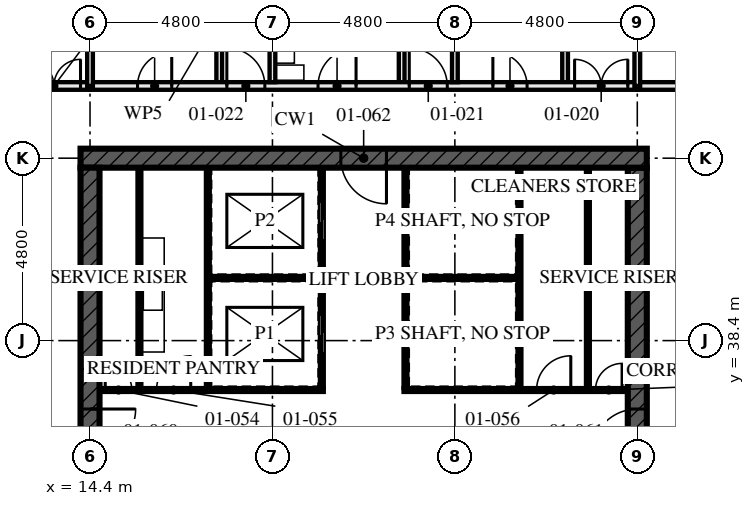
"""IFC4 building model, lengths in metres.
Left out: names, types, materials, properties, quantities, classifications, styles, units other than length and angle.
Written with IfcOpenShell. Run it as: python <this file> out.ifc"""

import sys

from ifc_helpers import new_model, si_unit, direction, frame, frame_2d, origin, place, context, subcontext, project, spatial, rectangle, extrude, element, fill, save


model = new_model("IFC4")
c1 = context("Model", 3, precision=1e-05, world=origin(), true_north=direction((0.0, 1.0)))
c2 = subcontext(c1, "Body", "Model", "MODEL_VIEW")
j1 = project(units=[si_unit("LENGTHUNIT", "METRE"), si_unit("PLANEANGLEUNIT", "RADIAN")], contexts=[c1])
p1 = place(None, origin())
s1 = spatial("IfcSite", under=j1, at=p1, CompositionType="ELEMENT")
p2 = place(p1, origin())
s2 = spatial("IfcBuilding", under=s1, at=p2, CompositionType="ELEMENT")
p3 = place(p2, frame((0.0, 0.0, 4.5)))
s3 = spatial("IfcBuildingStorey", under=s2, at=p3, CompositionType="ELEMENT", Elevation=4.5)
p4 = place(p3, frame((29.05, 43.2, -0.17), z_axis=(0.0, 0.0, 1.0), x_axis=(-1.0, 0.0, 0.0)))
e1 = element("IfcWall", 1, at=p4, inside=s3, PredefinedType="SHEAR", context=c2, shape_type="SweptSolid", body=[
    extrude(rectangle(XDim=14.9, YDim=0.5, at=frame_2d((7.45, 0.0))), origin(), (0.0, 0.0, 1.0), 4.5),
])
p5 = place(p4, frame((6.85, 0.0, 0.17)))
e2 = element("IfcOpeningElement", 2, at=p5, cuts=e1, PredefinedType="OPENING", context=c2, shape_type="SweptSolid", body=[
    extrude(rectangle(XDim=1.2, YDim=2.1, at=frame_2d((0.6, 1.05))), frame((0.0, 0.26, 0.0), z_axis=(0.0, -1.0, 0.0), x_axis=(1.0, 0.0, 0.0)), (0.0, 0.0, 1.0), 0.521),
])
p6 = place(p3, frame((14.4, 42.95, -0.17), z_axis=(0.0, 0.0, 1.0), x_axis=(0.0, -1.0, 0.0)))
e3 = element("IfcWall", 3, at=p6, inside=s3, PredefinedType="SHEAR", context=c2, shape_type="SweptSolid", body=[
    extrude(rectangle(XDim=13.9, YDim=0.5, at=frame_2d((6.95, 0.0))), origin(), (0.0, 0.0, 1.0), 4.5),
])
p7 = place(p6, frame((6.35, 0.0, 0.17)))
e4 = element("IfcOpeningElement", 4, at=p7, cuts=e3, PredefinedType="OPENING", context=c2, shape_type="SweptSolid", body=[
    extrude(rectangle(XDim=1.2, YDim=2.1, at=frame_2d((0.6, 1.05))), frame((0.0, 0.26, 0.0), z_axis=(0.0, -1.0, 0.0), x_axis=(1.0, 0.0, 0.0)), (0.0, 0.0, 1.0), 0.521),
])
p8 = place(p3, frame((28.8, 29.05, -0.17), z_axis=(0.0, 0.0, 1.0), x_axis=(0.0, 1.0, 0.0)))
e5 = element("IfcWall", 5, at=p8, inside=s3, PredefinedType="SHEAR", context=c2, shape_type="SweptSolid", body=[
    extrude(rectangle(XDim=13.9, YDim=0.5, at=frame_2d((6.95, 0.0))), origin(), (0.0, 0.0, 1.0), 4.5),
])
p9 = place(p8, frame((6.35, 0.0, 0.17)))
e6 = element("IfcOpeningElement", 6, at=p9, cuts=e5, PredefinedType="OPENING", context=c2, shape_type="SweptSolid", body=[
    extrude(rectangle(XDim=1.2, YDim=2.1, at=frame_2d((0.6, 1.05))), frame((0.0, 0.26, 0.0), z_axis=(0.0, -1.0, 0.0), x_axis=(1.0, 0.0, 0.0)), (0.0, 0.0, 1.0), 0.521),
])
p10 = place(p3, frame((14.4, 45.1, 0.0), z_axis=(0.0, 0.0, 1.0), x_axis=(-1.0, 0.0, 0.0)))
e7 = element("IfcWall", 7, at=p10, inside=s3, PredefinedType="PARTITIONING", context=c2, shape_type="SweptSolid", body=[
    extrude(rectangle(XDim=14.855, YDim=0.2, at=frame_2d((7.427, 0.0))), origin(), (0.0, 0.0, 1.0), 3.32),
])
p11 = place(p10, frame((0.25, 0.0, 0.0)))
e8 = element("IfcOpeningElement", 8, at=p11, cuts=e7, PredefinedType="OPENING", context=c2, shape_type="SweptSolid", body=[
    extrude(rectangle(XDim=1.4, YDim=2.4, at=frame_2d((0.7, 1.2))), frame((0.0, 0.111, 0.0), z_axis=(0.0, -1.0, 0.0), x_axis=(1.0, 0.0, 0.0)), (0.0, 0.0, 1.0), 0.221),
])
p12 = place(p10, frame((5.05, 0.0, 0.0)))
e9 = element("IfcOpeningElement", 9, at=p12, cuts=e7, PredefinedType="OPENING", context=c2, shape_type="SweptSolid", body=[
    extrude(rectangle(XDim=1.4, YDim=2.4, at=frame_2d((0.7, 1.2))), frame((0.0, 0.111, 0.0), z_axis=(0.0, -1.0, 0.0), x_axis=(1.0, 0.0, 0.0)), (0.0, 0.0, 1.0), 0.221),
])
p13 = place(p10, frame((9.8, 0.0, 0.0)))
e10 = element("IfcOpeningElement", 10, at=p13, cuts=e7, PredefinedType="OPENING", context=c2, shape_type="SweptSolid", body=[
    extrude(rectangle(XDim=1.0, YDim=2.4, at=frame_2d((0.5, 1.2))), frame((0.0, 0.111, 0.0), z_axis=(0.0, -1.0, 0.0), x_axis=(1.0, 0.0, 0.0)), (0.0, 0.0, 1.0), 0.221),
])
p14 = place(p10, frame((2.9, 0.0, 0.0)))
e11 = element("IfcOpeningElement", 11, at=p14, cuts=e7, PredefinedType="OPENING", context=c2, shape_type="SweptSolid", body=[
    extrude(rectangle(XDim=0.9, YDim=2.1, at=frame_2d((0.45, 1.05))), frame((0.0, 0.111, 0.0), z_axis=(0.0, -1.0, 0.0), x_axis=(1.0, 0.0, 0.0)), (0.0, 0.0, 1.0), 0.221),
])
p15 = place(p10, frame((7.65, 0.0, 0.0)))
e12 = element("IfcOpeningElement", 12, at=p15, cuts=e7, PredefinedType="OPENING", context=c2, shape_type="SweptSolid", body=[
    extrude(rectangle(XDim=1.0, YDim=2.1, at=frame_2d((0.5, 1.05))), frame((0.0, 0.111, 0.0), z_axis=(0.0, -1.0, 0.0), x_axis=(1.0, 0.0, 0.0)), (0.0, 0.0, 1.0), 0.221),
])
p16 = place(p10, frame((12.25, 0.0, 0.0)))
e13 = element("IfcOpeningElement", 13, at=p16, cuts=e7, PredefinedType="OPENING", context=c2, shape_type="SweptSolid", body=[
    extrude(rectangle(XDim=0.9, YDim=2.1, at=frame_2d((0.45, 1.05))), frame((0.0, 0.111, 0.0), z_axis=(0.0, -1.0, 0.0), x_axis=(1.0, 0.0, 0.0)), (0.0, 0.0, 1.0), 0.221),
])
for number, where, z_axis, x_axis in (
    (14, (26.9, 48.7, 0.0), (0.0, 0.0, 1.0), (0.0, -1.0, 0.0)),
    (15, (22.6, 48.7, 0.0), (0.0, 0.0, 1.0), (0.0, -1.0, 0.0)),
    (16, (17.8, 48.7, 0.0), (0.0, 0.0, 1.0), (0.0, -1.0, 0.0)),
):
    element("IfcWall", number, at=place(p3, frame(where, z_axis=z_axis, x_axis=x_axis)), inside=s3, PredefinedType="PARTITIONING", context=c2, shape_type="SweptSolid", body=[
        extrude(rectangle(XDim=3.5, YDim=0.15, at=frame_2d((1.75, 0.0))), origin(), (0.0, 0.0, 1.0), 3.55),
    ])
for number, where, z_axis, x_axis in (
    (17, (24.0, 57.255, 0.0), (0.0, 0.0, 1.0), (0.0, -1.0, 0.0)),
    (18, (19.2, 57.255, 0.0), (0.0, 0.0, 1.0), (0.0, -1.0, 0.0)),
):
    element("IfcWall", number, at=place(p3, frame(where, z_axis=z_axis, x_axis=x_axis)), inside=s3, PredefinedType="PARTITIONING", context=c2, shape_type="SweptSolid", body=[
        extrude(rectangle(XDim=12.055, YDim=0.15, at=frame_2d((6.027, 0.0))), origin(), (0.0, 0.0, 1.0), 3.55),
    ])
p17 = place(p3, frame((28.8, 45.1, 0.0), z_axis=(0.0, 0.0, 1.0), x_axis=(-1.0, 0.0, 0.0)))
e19 = element("IfcWall", 19, at=p17, inside=s3, PredefinedType="PARTITIONING", context=c2, shape_type="SweptSolid", body=[
    extrude(rectangle(XDim=14.4, YDim=0.2, at=frame_2d((7.2, 0.0))), origin(), (0.0, 0.0, 1.0), 4.33),
])
p18 = place(p17, frame((0.25, 0.0, 0.0)))
e20 = element("IfcOpeningElement", 20, at=p18, cuts=e19, PredefinedType="OPENING", context=c2, shape_type="SweptSolid", body=[
    extrude(rectangle(XDim=1.4, YDim=2.4, at=frame_2d((0.7, 1.2))), frame((0.0, 0.111, 0.0), z_axis=(0.0, -1.0, 0.0), x_axis=(1.0, 0.0, 0.0)), (0.0, 0.0, 1.0), 0.221),
])
p19 = place(p17, frame((5.0, 0.0, 0.0)))
e21 = element("IfcOpeningElement", 21, at=p19, cuts=e19, PredefinedType="OPENING", context=c2, shape_type="SweptSolid", body=[
    extrude(rectangle(XDim=1.0, YDim=2.4, at=frame_2d((0.5, 1.2))), frame((0.0, 0.111, 0.0), z_axis=(0.0, -1.0, 0.0), x_axis=(1.0, 0.0, 0.0)), (0.0, 0.0, 1.0), 0.221),
])
p20 = place(p17, frame((9.8, 0.0, 0.0)))
e22 = element("IfcOpeningElement", 22, at=p20, cuts=e19, PredefinedType="OPENING", context=c2, shape_type="SweptSolid", body=[
    extrude(rectangle(XDim=1.0, YDim=2.4, at=frame_2d((0.5, 1.2))), frame((0.0, 0.111, 0.0), z_axis=(0.0, -1.0, 0.0), x_axis=(1.0, 0.0, 0.0)), (0.0, 0.0, 1.0), 0.221),
])
p21 = place(p17, frame((2.9, 0.0, 0.0)))
e23 = element("IfcOpeningElement", 23, at=p21, cuts=e19, PredefinedType="OPENING", context=c2, shape_type="SweptSolid", body=[
    extrude(rectangle(XDim=0.9, YDim=2.1, at=frame_2d((0.45, 1.05))), frame((0.0, 0.111, 0.0), z_axis=(0.0, -1.0, 0.0), x_axis=(1.0, 0.0, 0.0)), (0.0, 0.0, 1.0), 0.221),
])
p22 = place(p17, frame((7.4, 0.0, 0.0)))
e24 = element("IfcOpeningElement", 24, at=p22, cuts=e19, PredefinedType="OPENING", context=c2, shape_type="SweptSolid", body=[
    extrude(rectangle(XDim=1.0, YDim=2.1, at=frame_2d((0.5, 1.05))), frame((0.0, 0.111, 0.0), z_axis=(0.0, -1.0, 0.0), x_axis=(1.0, 0.0, 0.0)), (0.0, 0.0, 1.0), 0.221),
])
p23 = place(p17, frame((12.25, 0.0, 0.0)))
e25 = element("IfcOpeningElement", 25, at=p23, cuts=e19, PredefinedType="OPENING", context=c2, shape_type="SweptSolid", body=[
    extrude(rectangle(XDim=0.9, YDim=2.1, at=frame_2d((0.45, 1.05))), frame((0.0, 0.111, 0.0), z_axis=(0.0, -1.0, 0.0), x_axis=(1.0, 0.0, 0.0)), (0.0, 0.0, 1.0), 0.221),
])
p24 = place(p3, frame((43.655, 45.1, 0.0), z_axis=(0.0, 0.0, 1.0), x_axis=(-1.0, 0.0, 0.0)))
e26 = element("IfcWall", 26, at=p24, inside=s3, PredefinedType="PARTITIONING", context=c2, shape_type="SweptSolid", body=[
    extrude(rectangle(XDim=14.855, YDim=0.2, at=frame_2d((7.427, 0.0))), origin(), (0.0, 0.0, 1.0), 3.32),
])
p25 = place(p24, frame((0.705, 0.0, 0.0)))
e27 = element("IfcOpeningElement", 27, at=p25, cuts=e26, PredefinedType="OPENING", context=c2, shape_type="SweptSolid", body=[
    extrude(rectangle(XDim=1.4, YDim=2.4, at=frame_2d((0.7, 1.2))), frame((0.0, 0.111, 0.0), z_axis=(0.0, -1.0, 0.0), x_axis=(1.0, 0.0, 0.0)), (0.0, 0.0, 1.0), 0.221),
])
p26 = place(p24, frame((5.505, 0.0, 0.0)))
e28 = element("IfcOpeningElement", 28, at=p26, cuts=e26, PredefinedType="OPENING", context=c2, shape_type="SweptSolid", body=[
    extrude(rectangle(XDim=1.4, YDim=2.4, at=frame_2d((0.7, 1.2))), frame((0.0, 0.111, 0.0), z_axis=(0.0, -1.0, 0.0), x_axis=(1.0, 0.0, 0.0)), (0.0, 0.0, 1.0), 0.221),
])
p27 = place(p24, frame((10.255, 0.0, 0.0)))
e29 = element("IfcOpeningElement", 29, at=p27, cuts=e26, PredefinedType="OPENING", context=c2, shape_type="SweptSolid", body=[
    extrude(rectangle(XDim=1.0, YDim=2.4, at=frame_2d((0.5, 1.2))), frame((0.0, 0.111, 0.0), z_axis=(0.0, -1.0, 0.0), x_axis=(1.0, 0.0, 0.0)), (0.0, 0.0, 1.0), 0.221),
])
p28 = place(p24, frame((3.355, 0.0, 0.0)))
e30 = element("IfcOpeningElement", 30, at=p28, cuts=e26, PredefinedType="OPENING", context=c2, shape_type="SweptSolid", body=[
    extrude(rectangle(XDim=0.9, YDim=2.1, at=frame_2d((0.45, 1.05))), frame((0.0, 0.111, 0.0), z_axis=(0.0, -1.0, 0.0), x_axis=(1.0, 0.0, 0.0)), (0.0, 0.0, 1.0), 0.221),
])
p29 = place(p24, frame((8.105, 0.0, 0.0)))
e31 = element("IfcOpeningElement", 31, at=p29, cuts=e26, PredefinedType="OPENING", context=c2, shape_type="SweptSolid", body=[
    extrude(rectangle(XDim=1.0, YDim=2.1, at=frame_2d((0.5, 1.05))), frame((0.0, 0.111, 0.0), z_axis=(0.0, -1.0, 0.0), x_axis=(1.0, 0.0, 0.0)), (0.0, 0.0, 1.0), 0.221),
])
p30 = place(p24, frame((12.705, 0.0, 0.0)))
e32 = element("IfcOpeningElement", 32, at=p30, cuts=e26, PredefinedType="OPENING", context=c2, shape_type="SweptSolid", body=[
    extrude(rectangle(XDim=0.9, YDim=2.1, at=frame_2d((0.45, 1.05))), frame((0.0, 0.111, 0.0), z_axis=(0.0, -1.0, 0.0), x_axis=(1.0, 0.0, 0.0)), (0.0, 0.0, 1.0), 0.221),
])
for number, where, z_axis, x_axis in (
    (33, (15.7, 37.15, 0.0), (0.0, 0.0, 1.0), (0.0, 1.0, 0.0)),
    (34, (27.5, 37.15, 0.0), (0.0, 0.0, 1.0), (0.0, 1.0, 0.0)),
):
    element("IfcWall", number, at=place(p3, frame(where, z_axis=z_axis, x_axis=x_axis)), inside=s3, PredefinedType="SOLIDWALL", context=c2, shape_type="SweptSolid", body=[
        extrude(rectangle(XDim=5.8, YDim=0.1, at=frame_2d((2.9, 0.0))), origin(), (0.0, 0.0, 1.0), 4.33),
    ])
p31 = place(p3, frame((20.5, 37.15, 0.0), z_axis=(0.0, 0.0, 1.0), x_axis=(0.0, 1.0, 0.0)))
e35 = element("IfcWall", 35, at=p31, inside=s3, PredefinedType="SOLIDWALL", context=c2, shape_type="SweptSolid", body=[
    extrude(rectangle(XDim=5.8, YDim=0.1, at=frame_2d((2.9, 0.0))), origin(), (0.0, 0.0, 1.0), 4.33),
])
p32 = place(p31, frame((0.925, 0.0, 0.0)))
e36 = element("IfcOpeningElement", 36, at=p32, cuts=e35, PredefinedType="OPENING", context=c2, shape_type="SweptSolid", body=[
    extrude(rectangle(XDim=1.0, YDim=2.1, at=frame_2d((0.5, 1.05))), frame((0.0, 0.061, 0.0), z_axis=(0.0, -1.0, 0.0), x_axis=(1.0, 0.0, 0.0)), (0.0, 0.0, 1.0), 0.121),
])
p33 = place(p31, frame((3.9, 0.0, 0.0)))
e37 = element("IfcOpeningElement", 37, at=p33, cuts=e35, PredefinedType="OPENING", context=c2, shape_type="SweptSolid", body=[
    extrude(rectangle(XDim=1.0, YDim=2.1, at=frame_2d((0.5, 1.05))), frame((0.0, 0.061, 0.0), z_axis=(0.0, -1.0, 0.0), x_axis=(1.0, 0.0, 0.0)), (0.0, 0.0, 1.0), 0.121),
])
p34 = place(p3, frame((22.7, 37.15, 0.0), z_axis=(0.0, 0.0, 1.0), x_axis=(0.0, 1.0, 0.0)))
e38 = element("IfcWall", 38, at=p34, inside=s3, PredefinedType="SOLIDWALL", context=c2, shape_type="SweptSolid", body=[
    extrude(rectangle(XDim=5.8, YDim=0.1, at=frame_2d((2.9, 0.0))), origin(), (0.0, 0.0, 1.0), 4.33),
])
p35 = place(p3, frame((14.65, 37.1, 0.0), z_axis=(0.0, 0.0, 1.0), x_axis=(1.0, 0.0, 0.0)))
e39 = element("IfcWall", 39, at=p35, inside=s3, PredefinedType="SOLIDWALL", context=c2, shape_type="SweptSolid", body=[
    extrude(rectangle(XDim=5.9, YDim=0.1, at=frame_2d((2.95, 0.0))), origin(), (0.0, 0.0, 1.0), 4.33),
])
p36 = place(p35, frame((0.15, 0.0, 0.0)))
e40 = element("IfcOpeningElement", 40, at=p36, cuts=e39, PredefinedType="OPENING", context=c2, shape_type="SweptSolid", body=[
    extrude(rectangle(XDim=0.7, YDim=2.1, at=frame_2d((0.35, 1.05))), frame((0.0, 0.061, 0.0), z_axis=(0.0, -1.0, 0.0), x_axis=(1.0, 0.0, 0.0)), (0.0, 0.0, 1.0), 0.121),
])
p37 = place(p35, frame((1.5, 0.0, 0.0)))
e41 = element("IfcOpeningElement", 41, at=p37, cuts=e39, PredefinedType="OPENING", context=c2, shape_type="SweptSolid", body=[
    extrude(rectangle(XDim=0.9, YDim=2.1, at=frame_2d((0.45, 1.05))), frame((0.0, 0.061, 0.0), z_axis=(0.0, -1.0, 0.0), x_axis=(1.0, 0.0, 0.0)), (0.0, 0.0, 1.0), 0.121),
])
p38 = place(p3, frame((22.65, 37.1, 0.0), z_axis=(0.0, 0.0, 1.0), x_axis=(1.0, 0.0, 0.0)))
e42 = element("IfcWall", 42, at=p38, inside=s3, PredefinedType="SOLIDWALL", context=c2, shape_type="SweptSolid", body=[
    extrude(rectangle(XDim=5.9, YDim=0.1, at=frame_2d((2.95, 0.0))), origin(), (0.0, 0.0, 1.0), 4.33),
])
p39 = place(p38, frame((3.5, 0.0, 0.0)))
e43 = element("IfcOpeningElement", 43, at=p39, cuts=e42, PredefinedType="OPENING", context=c2, shape_type="SweptSolid", body=[
    extrude(rectangle(XDim=0.9, YDim=2.1, at=frame_2d((0.45, 1.05))), frame((0.0, 0.061, 0.0), z_axis=(0.0, -1.0, 0.0), x_axis=(1.0, 0.0, 0.0)), (0.0, 0.0, 1.0), 0.121),
])
p40 = place(p38, frame((5.05, 0.0, 0.0)))
e44 = element("IfcOpeningElement", 44, at=p40, cuts=e42, PredefinedType="OPENING", context=c2, shape_type="SweptSolid", body=[
    extrude(rectangle(XDim=0.7, YDim=2.1, at=frame_2d((0.35, 1.05))), frame((0.0, 0.061, 0.0), z_axis=(0.0, -1.0, 0.0), x_axis=(1.0, 0.0, 0.0)), (0.0, 0.0, 1.0), 0.121),
])
p41 = place(p3, frame((17.5, 37.15, 0.0), z_axis=(0.0, 0.0, 1.0), x_axis=(0.0, 1.0, 0.0)))
e45 = element("IfcWall", 45, at=p41, inside=s3, PredefinedType="SOLIDWALL", context=c2, shape_type="SweptSolid", body=[
    extrude(rectangle(XDim=5.8, YDim=0.1, at=frame_2d((2.9, 0.0))), origin(), (0.0, 0.0, 1.0), 4.33),
])
for number, where, z_axis, x_axis in (
    (46, (17.55, 40.05, 0.0), (0.0, 0.0, 1.0), (1.0, 0.0, 0.0)),
    (47, (22.75, 40.05, 0.0), (0.0, 0.0, 1.0), (1.0, 0.0, 0.0)),
):
    element("IfcWall", number, at=place(p3, frame(where, z_axis=z_axis, x_axis=x_axis)), inside=s3, PredefinedType="SOLIDWALL", context=c2, shape_type="SweptSolid", body=[
        extrude(rectangle(XDim=2.9, YDim=0.1, at=frame_2d((1.45, 0.0))), origin(), (0.0, 0.0, 1.0), 4.33),
    ])
p42 = place(p3, frame((25.7, 37.15, 0.0), z_axis=(0.0, 0.0, 1.0), x_axis=(0.0, 1.0, 0.0)))
e48 = element("IfcWall", 48, at=p42, inside=s3, PredefinedType="SOLIDWALL", context=c2, shape_type="SweptSolid", body=[
    extrude(rectangle(XDim=5.8, YDim=0.1, at=frame_2d((2.9, 0.0))), origin(), (0.0, 0.0, 1.0), 4.33),
])
for number, where, z_axis, x_axis in (
    (49, (14.4, 45.1, 0.0), (0.0, 0.0, 1.0), (0.0, 1.0, 0.0)),
    (50, (28.8, 45.1, 0.0), (0.0, 0.0, 1.0), (0.0, 1.0, 0.0)),
):
    element("IfcWall", number, at=place(p3, frame(where, z_axis=z_axis, x_axis=x_axis)), inside=s3, PredefinedType="PARTITIONING", context=c2, shape_type="SweptSolid", body=[
        extrude(rectangle(XDim=2.53, YDim=0.15, at=frame_2d((1.265, 0.0))), origin(), (0.0, 0.0, 1.0), 3.32),
    ])
p43 = place(p11, frame((1.4, 0.0, 0.0), z_axis=(0.0, 0.0, 1.0), x_axis=(-1.0, 0.0, 0.0)))
e51 = element("IfcDoor", 51, at=p43, inside=s3, OperationType="DOUBLE_DOOR_SINGLE_SWING", PredefinedType="DOOR", context=c2, shape_type="SweptSolid", body=[
    extrude(rectangle(XDim=1.4, YDim=2.4, at=frame_2d((0.7, 1.2))), frame((0.0, 0.027, 0.0), z_axis=(0.0, -1.0, 0.0), x_axis=(1.0, 0.0, 0.0)), (0.0, 0.0, 1.0), 0.054),
])
fill(e8, e51)
p44 = place(p18, frame((1.4, 0.0, 0.0), z_axis=(0.0, 0.0, 1.0), x_axis=(-1.0, 0.0, 0.0)))
e52 = element("IfcDoor", 52, at=p44, inside=s3, OperationType="DOUBLE_DOOR_SINGLE_SWING", PredefinedType="DOOR", context=c2, shape_type="SweptSolid", body=[
    extrude(rectangle(XDim=1.4, YDim=2.4, at=frame_2d((0.7, 1.2))), frame((0.0, 0.027, 0.0), z_axis=(0.0, -1.0, 0.0), x_axis=(1.0, 0.0, 0.0)), (0.0, 0.0, 1.0), 0.054),
])
fill(e20, e52)
p45 = place(p19, frame((1.0, 0.0, 0.0), z_axis=(0.0, 0.0, 1.0), x_axis=(-1.0, 0.0, 0.0)))
e53 = element("IfcDoor", 53, at=p45, inside=s3, OperationType="SINGLE_SWING_RIGHT", PredefinedType="DOOR", context=c2, shape_type="SweptSolid", body=[
    extrude(rectangle(XDim=1.0, YDim=2.4, at=frame_2d((0.5, 1.2))), frame((0.0, 0.027, 0.0), z_axis=(0.0, -1.0, 0.0), x_axis=(1.0, 0.0, 0.0)), (0.0, 0.0, 1.0), 0.054),
])
fill(e21, e53)
p46 = place(p20, frame((1.0, 0.0, 0.0), z_axis=(0.0, 0.0, 1.0), x_axis=(-1.0, 0.0, 0.0)))
e54 = element("IfcDoor", 54, at=p46, inside=s3, OperationType="SINGLE_SWING_RIGHT", PredefinedType="DOOR", context=c2, shape_type="SweptSolid", body=[
    extrude(rectangle(XDim=1.0, YDim=2.4, at=frame_2d((0.5, 1.2))), frame((0.0, 0.027, 0.0), z_axis=(0.0, -1.0, 0.0), x_axis=(1.0, 0.0, 0.0)), (0.0, 0.0, 1.0), 0.054),
])
fill(e22, e54)
p47 = place(p21, frame((0.9, 0.0, 0.0), z_axis=(0.0, 0.0, 1.0), x_axis=(-1.0, 0.0, 0.0)))
e55 = element("IfcDoor", 55, at=p47, inside=s3, OperationType="SINGLE_SWING_RIGHT", PredefinedType="DOOR", context=c2, shape_type="SweptSolid", body=[
    extrude(rectangle(XDim=0.9, YDim=2.1, at=frame_2d((0.45, 1.05))), frame((0.0, 0.027, 0.0), z_axis=(0.0, -1.0, 0.0), x_axis=(1.0, 0.0, 0.0)), (0.0, 0.0, 1.0), 0.054),
])
fill(e23, e55)
p48 = place(p22, frame((1.0, 0.0, 0.0), z_axis=(0.0, 0.0, 1.0), x_axis=(-1.0, 0.0, 0.0)))
e56 = element("IfcDoor", 56, at=p48, inside=s3, OperationType="SINGLE_SWING_LEFT", PredefinedType="DOOR", context=c2, shape_type="SweptSolid", body=[
    extrude(rectangle(XDim=1.0, YDim=2.1, at=frame_2d((0.5, 1.05))), frame((0.0, 0.027, 0.0), z_axis=(0.0, -1.0, 0.0), x_axis=(1.0, 0.0, 0.0)), (0.0, 0.0, 1.0), 0.054),
])
fill(e24, e56)
p49 = place(p23, frame((0.9, 0.0, 0.0), z_axis=(0.0, 0.0, 1.0), x_axis=(-1.0, 0.0, 0.0)))
e57 = element("IfcDoor", 57, at=p49, inside=s3, OperationType="SINGLE_SWING_LEFT", PredefinedType="DOOR", context=c2, shape_type="SweptSolid", body=[
    extrude(rectangle(XDim=0.9, YDim=2.1, at=frame_2d((0.45, 1.05))), frame((0.0, 0.027, 0.0), z_axis=(0.0, -1.0, 0.0), x_axis=(1.0, 0.0, 0.0)), (0.0, 0.0, 1.0), 0.054),
])
fill(e25, e57)
p50 = place(p32, origin())
e58 = element("IfcDoor", 58, at=p50, inside=s3, OperationType="SLIDING_TO_LEFT", PredefinedType="DOOR", context=c2, shape_type="SweptSolid", body=[
    extrude(rectangle(XDim=1.0, YDim=2.1, at=frame_2d((0.5, 1.05))), frame((0.0, 0.05, 0.0), z_axis=(0.0, -1.0, 0.0), x_axis=(1.0, 0.0, 0.0)), (0.0, 0.0, 1.0), 0.1),
])
fill(e36, e58)
p51 = place(p33, origin())
e59 = element("IfcDoor", 59, at=p51, inside=s3, OperationType="SLIDING_TO_LEFT", PredefinedType="DOOR", context=c2, shape_type="SweptSolid", body=[
    extrude(rectangle(XDim=1.0, YDim=2.1, at=frame_2d((0.5, 1.05))), frame((0.0, 0.05, 0.0), z_axis=(0.0, -1.0, 0.0), x_axis=(1.0, 0.0, 0.0)), (0.0, 0.0, 1.0), 0.1),
])
fill(e37, e59)
p52 = place(p36, origin())
e60 = element("IfcDoor", 60, at=p52, inside=s3, OperationType="SINGLE_SWING_RIGHT", PredefinedType="DOOR", context=c2, shape_type="SweptSolid", body=[
    extrude(rectangle(XDim=0.7, YDim=2.1, at=frame_2d((0.35, 1.05))), frame((0.0, 0.027, 0.0), z_axis=(0.0, -1.0, 0.0), x_axis=(1.0, 0.0, 0.0)), (0.0, 0.0, 1.0), 0.054),
])
fill(e40, e60)
p53 = place(p37, origin())
e61 = element("IfcDoor", 61, at=p53, inside=s3, OperationType="SINGLE_SWING_LEFT", PredefinedType="DOOR", context=c2, shape_type="SweptSolid", body=[
    extrude(rectangle(XDim=0.9, YDim=2.1, at=frame_2d((0.45, 1.05))), frame((0.0, 0.027, 0.0), z_axis=(0.0, -1.0, 0.0), x_axis=(1.0, 0.0, 0.0)), (0.0, 0.0, 1.0), 0.054),
])
fill(e41, e61)
p54 = place(p39, origin())
e62 = element("IfcDoor", 62, at=p54, inside=s3, OperationType="SINGLE_SWING_LEFT", PredefinedType="DOOR", context=c2, shape_type="SweptSolid", body=[
    extrude(rectangle(XDim=0.9, YDim=2.1, at=frame_2d((0.45, 1.05))), frame((0.0, 0.027, 0.0), z_axis=(0.0, -1.0, 0.0), x_axis=(1.0, 0.0, 0.0)), (0.0, 0.0, 1.0), 0.054),
])
fill(e43, e62)
p55 = place(p40, origin())
e63 = element("IfcDoor", 63, at=p55, inside=s3, OperationType="SINGLE_SWING_LEFT", PredefinedType="DOOR", context=c2, shape_type="SweptSolid", body=[
    extrude(rectangle(XDim=0.7, YDim=2.1, at=frame_2d((0.35, 1.05))), frame((0.0, 0.027, 0.0), z_axis=(0.0, -1.0, 0.0), x_axis=(1.0, 0.0, 0.0)), (0.0, 0.0, 1.0), 0.054),
])
fill(e44, e63)
p56 = place(p7, origin())
e64 = element("IfcDoor", 64, at=p56, inside=s3, OperationType="SINGLE_SWING_LEFT", PredefinedType="DOOR", context=c2, shape_type="SweptSolid", body=[
    extrude(rectangle(XDim=1.2, YDim=2.1, at=frame_2d((0.6, 1.05))), frame((0.0, 0.027, 0.0), z_axis=(0.0, -1.0, 0.0), x_axis=(1.0, 0.0, 0.0)), (0.0, 0.0, 1.0), 0.054),
])
fill(e4, e64)
p57 = place(p9, origin())
e65 = element("IfcDoor", 65, at=p57, inside=s3, OperationType="SINGLE_SWING_LEFT", PredefinedType="DOOR", context=c2, shape_type="SweptSolid", body=[
    extrude(rectangle(XDim=1.2, YDim=2.1, at=frame_2d((0.6, 1.05))), frame((0.0, 0.027, 0.0), z_axis=(0.0, -1.0, 0.0), x_axis=(1.0, 0.0, 0.0)), (0.0, 0.0, 1.0), 0.054),
])
fill(e6, e65)
p58 = place(p5, origin())
e66 = element("IfcDoor", 66, at=p58, inside=s3, OperationType="SINGLE_SWING_LEFT", PredefinedType="DOOR", context=c2, shape_type="SweptSolid", body=[
    extrude(rectangle(XDim=1.2, YDim=2.1, at=frame_2d((0.6, 1.05))), frame((0.0, 0.027, 0.0), z_axis=(0.0, -1.0, 0.0), x_axis=(1.0, 0.0, 0.0)), (0.0, 0.0, 1.0), 0.054),
])
fill(e2, e66)
save(model, sys.argv[1])
